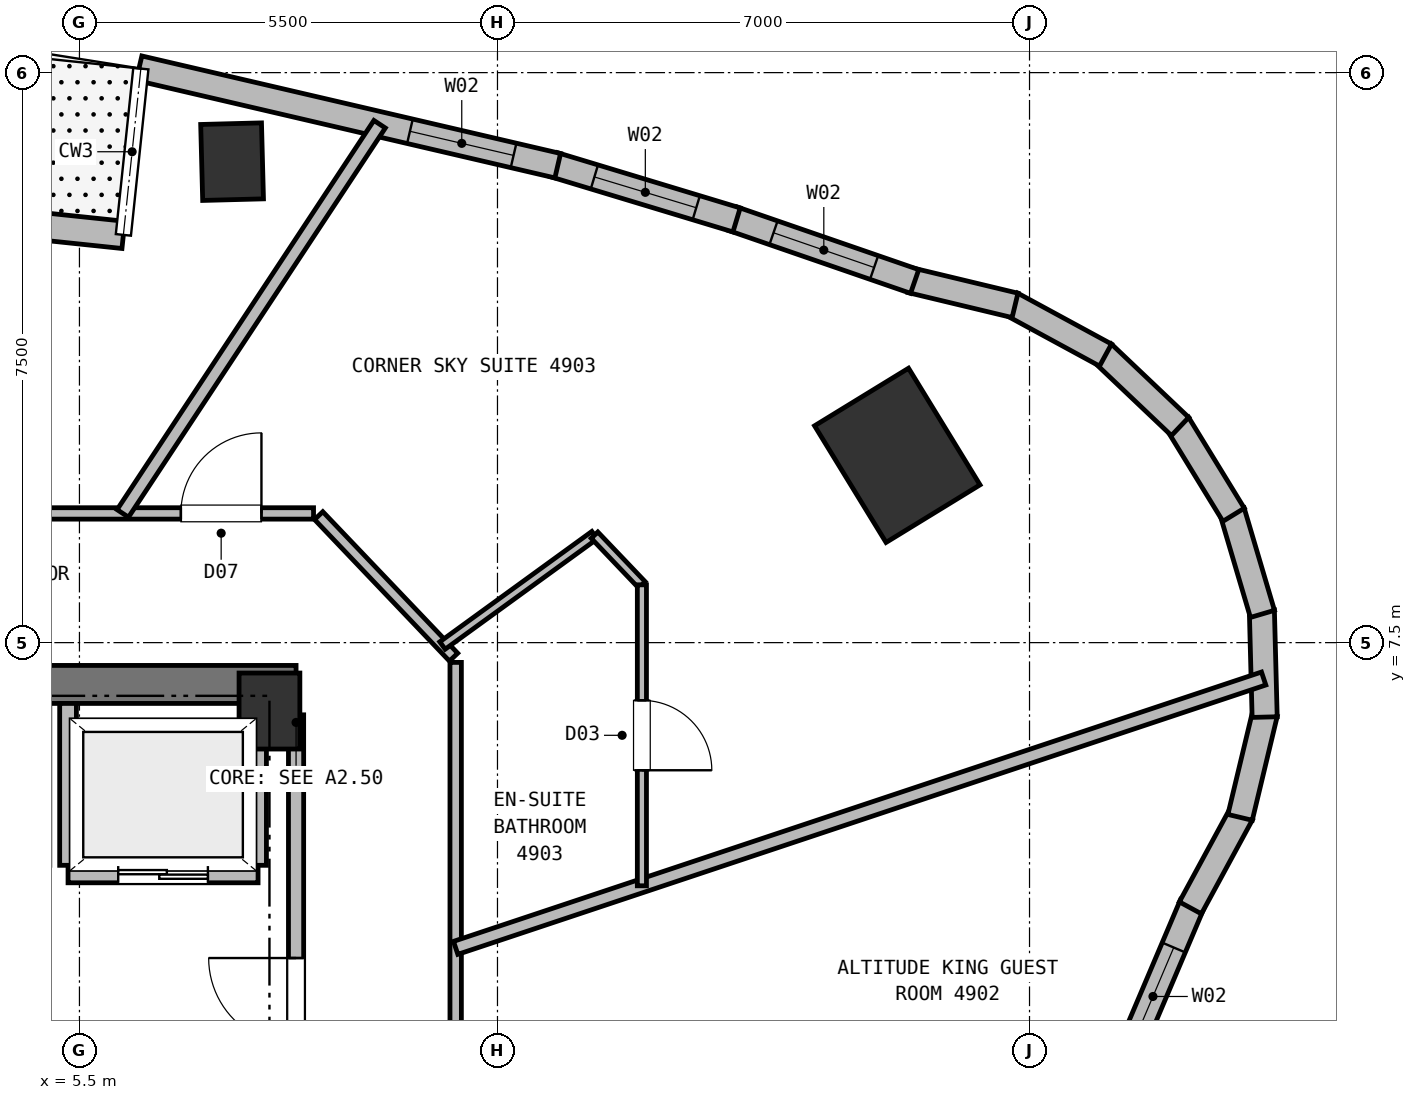
"""IFC4 building model, lengths in metres.
Left out: names, types, materials, properties, quantities, classifications, styles, units other than length and angle.
Written with IfcOpenShell. Run it as: python <this file> out.ifc"""

import sys

from ifc_helpers import new_model, si_unit, direction, frame, frame_2d, origin, origin_2d, place, context, subcontext, project, spatial, rectangle, extrude, element, fill, save


model = new_model("IFC4")
c1 = context("Model", 3, precision=1e-05, world=origin(), true_north=direction((0.0, 1.0)))
c2 = subcontext(c1, "Body", "Model", "MODEL_VIEW")
j1 = project(units=[si_unit("LENGTHUNIT", "METRE"), si_unit("PLANEANGLEUNIT", "RADIAN")], contexts=[c1])
p1 = place(None, origin())
s1 = spatial("IfcSite", under=j1, at=p1, CompositionType="ELEMENT")
p2 = place(p1, origin())
s2 = spatial("IfcBuilding", under=s1, at=p2, CompositionType="ELEMENT")
p3 = place(p2, frame((0.0, 0.0, 186.55)))
s3 = spatial("IfcBuildingStorey", under=s2, at=p3, CompositionType="ELEMENT", Elevation=186.55)
p4 = place(p3, frame((8.0, 6.6, 0.0), z_axis=(0.0, 0.0, 1.0), x_axis=(1.0, 0.0, 0.0)))
e1 = element("IfcColumn", 1, at=p4, inside=s3, PredefinedType="COLUMN", context=c2, shape_type="SweptSolid", body=[
    extrude(rectangle(XDim=0.8, YDim=1.0, at=origin_2d()), origin(), (0.0, 0.0, 1.0), 3.8),
])
p5 = place(p3, frame((-8.35, 6.95, 0.0), z_axis=(0.0, 0.0, 1.0), x_axis=(1.0, 0.0, 0.0)))
e2 = element("IfcWall", 2, at=p5, inside=s3, PredefinedType="SHEAR", context=c2, shape_type="SweptSolid", body=[
    extrude(rectangle(XDim=16.7, YDim=0.5, at=frame_2d((8.35, 0.0))), origin(), (0.0, 0.0, 1.0), 3.55),
])
p6 = place(p3, frame((16.26, 9.964, 0.0), z_axis=(0.0, 0.0, 1.0), x_axis=(0.852640164354, 0.522498564716, 0.0)))
e3 = element("IfcColumn", 3, at=p6, inside=s3, PredefinedType="COLUMN", context=c2, shape_type="SweptSolid", body=[
    extrude(rectangle(XDim=1.45, YDim=1.8, at=origin_2d()), origin(), (0.0, 0.0, 1.0), 3.8),
])
p7 = place(p3, frame((7.508, 13.828, 0.0), z_axis=(0.0, 0.0, 1.0), x_axis=(0.999657324976, 0.026176948308, 0.0)))
e4 = element("IfcColumn", 4, at=p7, inside=s3, PredefinedType="COLUMN", context=c2, shape_type="SweptSolid", body=[
    extrude(rectangle(XDim=0.8, YDim=1.0, at=origin_2d()), origin(), (0.0, 0.0, 1.0), 3.8),
])
p8 = place(p3, frame((-3.271, 13.848, 0.0), z_axis=(0.0, 0.0, 1.0), x_axis=(0.994520954065, -0.104537418785, 0.0)))
e5 = element("IfcWall", 5, at=p8, inside=s3, PredefinedType="SOLIDWALL", context=c2, shape_type="SweptSolid", body=[
    extrude(rectangle(XDim=9.4, YDim=0.36, at=frame_2d((4.7, 0.0))), origin(), (0.0, 0.0, 1.0), 3.55),
])
p9 = place(p8, frame((3.875, 0.0, 0.0)))
e6 = element("IfcOpeningElement", 6, at=p9, cuts=e5, PredefinedType="OPENING", context=c2, shape_type="SweptSolid", body=[
    extrude(rectangle(XDim=1.65, YDim=2.25, at=frame_2d((0.825, 1.125))), frame((0.0, 0.19, 0.0), z_axis=(0.0, -1.0, 0.0), x_axis=(1.0, 0.0, 0.0)), (0.0, 0.0, 1.0), 0.38),
])
p10 = place(p3, frame((20.138, 4.055, 0.0), z_axis=(0.0, 0.0, 1.0), x_axis=(-0.390838099147, -0.920459439766, 0.0)))
e7 = element("IfcWall", 7, at=p10, inside=s3, PredefinedType="SOLIDWALL", context=c2, shape_type="SweptSolid", body=[
    extrude(rectangle(XDim=2.632, YDim=0.33, at=frame_2d((1.316, 0.0))), origin(), (0.0, 0.0, 1.0), 3.55),
])
p11 = place(p10, frame((0.616, 0.0, 0.72)))
e8 = element("IfcOpeningElement", 8, at=p11, cuts=e7, PredefinedType="OPENING", context=c2, shape_type="SweptSolid", body=[
    extrude(rectangle(XDim=1.4, YDim=1.84, at=frame_2d((0.7, 0.92))), frame((0.0, 0.175, 0.0), z_axis=(0.0, -1.0, 0.0), x_axis=(1.0, 0.0, 0.0)), (0.0, 0.0, 1.0), 0.35),
])
p12 = place(p3, frame((20.788, 5.247, 0.0), z_axis=(0.0, 0.0, 1.0), x_axis=(-0.477137792558, -0.878828496871, 0.0)))
e9 = element("IfcWall", 9, at=p12, inside=s3, PredefinedType="SOLIDWALL", context=c2, shape_type="SweptSolid", body=[
    extrude(rectangle(XDim=1.408, YDim=0.33, at=frame_2d((0.704, 0.0))), origin(), (0.0, 0.0, 1.0), 3.55),
])
for number, where, z_axis, x_axis in (
    (10, (21.099, 6.57, 0.0), (0.0, 0.0, 1.0), (-0.233, -0.972, 0.0)),
    (11, (21.057, 7.927, 0.0), (0.0, 0.0, 1.0), (0.026, -1.0, 0.0)),
):
    element("IfcWall", number, at=place(p3, frame(where, z_axis=z_axis, x_axis=x_axis)), inside=s3, PredefinedType="SOLIDWALL", context=c2, shape_type="SweptSolid", body=[
        extrude(rectangle(XDim=1.407, YDim=0.33, at=frame_2d((0.704, 0.0))), origin(), (0.0, 0.0, 1.0), 3.55),
    ])
p13 = place(p3, frame((20.665, 9.228, 0.0), z_axis=(0.0, 0.0, 1.0), x_axis=(0.284100140437, -0.958794613149, 0.0)))
e12 = element("IfcWall", 12, at=p13, inside=s3, PredefinedType="SOLIDWALL", context=c2, shape_type="SweptSolid", body=[
    extrude(rectangle(XDim=1.408, YDim=0.33, at=frame_2d((0.704, 0.0))), origin(), (0.0, 0.0, 1.0), 3.55),
])
for number, where, z_axis, x_axis in (
    (13, (19.95, 10.383, 0.0), (0.0, 0.0, 1.0), (0.523, -0.853, 0.0)),
    (14, (18.96, 11.313, 0.0), (0.0, 0.0, 1.0), (0.725, -0.688, 0.0)),
):
    element("IfcWall", number, at=place(p3, frame(where, z_axis=z_axis, x_axis=x_axis)), inside=s3, PredefinedType="SOLIDWALL", context=c2, shape_type="SweptSolid", body=[
        extrude(rectangle(XDim=1.407, YDim=0.33, at=frame_2d((0.704, 0.0))), origin(), (0.0, 0.0, 1.0), 3.55),
    ])
p14 = place(p3, frame((17.763, 11.955, 0.0), z_axis=(0.0, 0.0, 1.0), x_axis=(0.8789012206, -0.47700382014, 0.0)))
e15 = element("IfcWall", 15, at=p14, inside=s3, PredefinedType="SOLIDWALL", context=c2, shape_type="SweptSolid", body=[
    extrude(rectangle(XDim=1.407, YDim=0.33, at=frame_2d((0.704, 0.0))), origin(), (0.0, 0.0, 1.0), 3.55),
])
p15 = place(p3, frame((16.441, 12.266, 0.0), z_axis=(0.0, 0.0, 1.0), x_axis=(0.972355799013, -0.23350417582, 0.0)))
e16 = element("IfcWall", 16, at=p15, inside=s3, PredefinedType="SOLIDWALL", context=c2, shape_type="SweptSolid", body=[
    extrude(rectangle(XDim=1.407, YDim=0.33, at=frame_2d((0.704, 0.0))), origin(), (0.0, 0.0, 1.0), 3.55),
])
p16 = place(p3, frame((14.098, 13.077, 0.0), z_axis=(0.0, 0.0, 1.0), x_axis=(0.945270347183, -0.326288171311, 0.0)))
e17 = element("IfcWall", 17, at=p16, inside=s3, PredefinedType="SOLIDWALL", context=c2, shape_type="SweptSolid", body=[
    extrude(rectangle(XDim=2.529, YDim=0.33, at=frame_2d((1.265, 0.0))), origin(), (0.0, 0.0, 1.0), 3.55),
])
p17 = place(p16, frame((0.564, 0.0, 0.72)))
e18 = element("IfcOpeningElement", 18, at=p17, cuts=e17, PredefinedType="OPENING", context=c2, shape_type="SweptSolid", body=[
    extrude(rectangle(XDim=1.4, YDim=1.84, at=frame_2d((0.7, 0.92))), frame((0.0, 0.175, 0.0), z_axis=(0.0, -1.0, 0.0), x_axis=(1.0, 0.0, 0.0)), (0.0, 0.0, 1.0), 0.35),
])
p18 = place(p3, frame((11.744, 13.788, 0.0), z_axis=(0.0, 0.0, 1.0), x_axis=(0.957175686943, -0.289507693031, 0.0)))
e19 = element("IfcWall", 19, at=p18, inside=s3, PredefinedType="SOLIDWALL", context=c2, shape_type="SweptSolid", body=[
    extrude(rectangle(XDim=2.509, YDim=0.33, at=frame_2d((1.254, 0.0))), origin(), (0.0, 0.0, 1.0), 3.55),
])
p19 = place(p18, frame((0.554, 0.0, 0.72)))
e20 = element("IfcOpeningElement", 20, at=p19, cuts=e19, PredefinedType="OPENING", context=c2, shape_type="SweptSolid", body=[
    extrude(rectangle(XDim=1.4, YDim=1.84, at=frame_2d((0.7, 0.92))), frame((0.0, 0.175, 0.0), z_axis=(0.0, -1.0, 0.0), x_axis=(1.0, 0.0, 0.0)), (0.0, 0.0, 1.0), 0.35),
])
p20 = place(p3, frame((6.284, 15.059, 0.0), z_axis=(0.0, 0.0, 1.0), x_axis=(0.973919150731, -0.226895323527, 0.0)))
e21 = element("IfcWall", 21, at=p20, inside=s3, PredefinedType="SOLIDWALL", context=c2, shape_type="SweptSolid", body=[
    extrude(rectangle(XDim=5.656, YDim=0.33, at=frame_2d((2.828, 0.0))), origin(), (0.0, 0.0, 1.0), 3.55),
])
p21 = place(p20, frame((3.66, 0.0, 0.72)))
e22 = element("IfcOpeningElement", 22, at=p21, cuts=e21, PredefinedType="OPENING", context=c2, shape_type="SweptSolid", body=[
    extrude(rectangle(XDim=1.4, YDim=1.88, at=frame_2d((0.7, 0.94))), frame((0.0, 0.175, 0.0), z_axis=(0.0, -1.0, 0.0), x_axis=(1.0, 0.0, 0.0)), (0.0, 0.0, 1.0), 0.35),
])
p22 = place(p3, frame((5.35, 4.45, 0.0), z_axis=(0.0, 0.0, 1.0), x_axis=(1.0, 0.0, 0.0)))
e23 = element("IfcWall", 23, at=p22, inside=s3, PredefinedType="PARTITIONING", context=c2, shape_type="SweptSolid", body=[
    extrude(rectangle(XDim=2.5, YDim=0.22, at=frame_2d((1.25, 0.0))), origin(), (0.0, 0.0, 1.0), 3.55),
])
p23 = place(p22, frame((0.66, 0.0, 0.0)))
e24 = element("IfcOpeningElement", 24, at=p23, cuts=e23, PredefinedType="OPENING", context=c2, shape_type="SweptSolid", body=[
    extrude(rectangle(XDim=1.18, YDim=2.15, at=frame_2d((0.59, 1.075))), frame((0.0, 0.12, 0.0), z_axis=(0.0, -1.0, 0.0), x_axis=(1.0, 0.0, 0.0)), (0.0, 0.0, 1.0), 0.24),
])
p24 = place(p3, frame((5.35, 4.57, 0.0), z_axis=(0.0, 0.0, 1.0), x_axis=(0.0, 1.0, 0.0)))
e25 = element("IfcWall", 25, at=p24, inside=s3, PredefinedType="PARTITIONING", context=c2, shape_type="SweptSolid", body=[
    extrude(rectangle(XDim=2.13, YDim=0.22, at=frame_2d((1.065, 0.0))), origin(), (0.0, 0.0, 1.0), 3.55),
])
p25 = place(p3, frame((7.85, 4.57, 0.0), z_axis=(0.0, 0.0, 1.0), x_axis=(0.0, 1.0, 0.0)))
e26 = element("IfcWall", 26, at=p25, inside=s3, PredefinedType="PARTITIONING", context=c2, shape_type="SweptSolid", body=[
    extrude(rectangle(XDim=2.13, YDim=0.22, at=frame_2d((1.065, 0.0))), origin(), (0.0, 0.0, 1.0), 3.18),
])
p26 = place(p3, frame((8.35, 1.25, 0.0), z_axis=(0.0, 0.0, 1.0), x_axis=(0.0, 1.0, 0.0)))
e27 = element("IfcWall", 27, at=p26, inside=s3, PredefinedType="PARTITIONING", context=c2, shape_type="SweptSolid", body=[
    extrude(rectangle(XDim=5.3, YDim=0.2, at=frame_2d((2.65, 0.0))), origin(), (0.0, 0.0, 1.0), 3.55),
])
p27 = place(p26, frame((0.95, 0.0, 0.0)))
e28 = element("IfcOpeningElement", 28, at=p27, cuts=e27, PredefinedType="OPENING", context=c2, shape_type="SweptSolid", body=[
    extrude(rectangle(XDim=1.15, YDim=2.15, at=frame_2d((0.575, 1.075))), frame((0.0, 0.11, 0.0), z_axis=(0.0, -1.0, 0.0), x_axis=(1.0, 0.0, 0.0)), (0.0, 0.0, 1.0), 0.22),
])
p28 = place(p3, frame((10.45, 7.24, 0.0), z_axis=(0.0, 0.0, 1.0), x_axis=(0.0, -1.0, 0.0)))
e29 = element("IfcWall", 29, at=p28, inside=s3, PredefinedType="PARTITIONING", context=c2, shape_type="SweptSolid", body=[
    extrude(rectangle(XDim=14.48, YDim=0.15, at=frame_2d((7.24, 0.0))), origin(), (0.0, 0.0, 1.0), 3.55),
])
p29 = place(p28, frame((11.674, 0.0, 0.0)))
e30 = element("IfcOpeningElement", 30, at=p29, cuts=e29, PredefinedType="OPENING", context=c2, shape_type="SweptSolid", body=[
    extrude(rectangle(XDim=1.06, YDim=2.15, at=frame_2d((0.53, 1.075))), frame((0.0, 0.085, 0.0), z_axis=(0.0, -1.0, 0.0), x_axis=(1.0, 0.0, 0.0)), (0.0, 0.0, 1.0), 0.17),
])
p30 = place(p28, frame((5.006, 0.0, 0.0)))
e31 = element("IfcOpeningElement", 31, at=p30, cuts=e29, PredefinedType="OPENING", context=c2, shape_type="SweptSolid", body=[
    extrude(rectangle(XDim=1.0, YDim=2.15, at=frame_2d((0.5, 1.075))), frame((0.0, 0.085, 0.0), z_axis=(0.0, -1.0, 0.0), x_axis=(1.0, 0.0, 0.0)), (0.0, 0.0, 1.0), 0.17),
])
p31 = place(p3, frame((8.648, 9.171, 0.0), z_axis=(0.0, 0.0, 1.0), x_axis=(0.689960858356, -0.723846678473, 0.0)))
e32 = element("IfcWall", 32, at=p31, inside=s3, PredefinedType="PARTITIONING", context=c2, shape_type="SweptSolid", body=[
    extrude(rectangle(XDim=2.572, YDim=0.15, at=frame_2d((1.286, 0.0))), origin(), (0.0, 0.0, 1.0), 3.55),
])
p32 = place(p3, frame((-8.58, 9.2, 0.0), z_axis=(0.0, 0.0, 1.0), x_axis=(1.0, 0.0, 0.0)))
e33 = element("IfcWall", 33, at=p32, inside=s3, PredefinedType="PARTITIONING", context=c2, shape_type="SweptSolid", body=[
    extrude(rectangle(XDim=17.16, YDim=0.15, at=frame_2d((8.58, 0.0))), origin(), (0.0, 0.0, 1.0), 3.55),
])
p33 = place(p32, frame((9.371, 0.0, 0.0)))
e34 = element("IfcOpeningElement", 34, at=p33, cuts=e33, PredefinedType="OPENING", context=c2, shape_type="SweptSolid", body=[
    extrude(rectangle(XDim=1.0, YDim=2.15, at=frame_2d((0.5, 1.075))), frame((0.0, 0.085, 0.0), z_axis=(0.0, -1.0, 0.0), x_axis=(1.0, 0.0, 0.0)), (0.0, 0.0, 1.0), 0.17),
])
p34 = place(p32, frame((15.415, 0.0, 0.0)))
e35 = element("IfcOpeningElement", 35, at=p34, cuts=e33, PredefinedType="OPENING", context=c2, shape_type="SweptSolid", body=[
    extrude(rectangle(XDim=1.06, YDim=2.15, at=frame_2d((0.53, 1.075))), frame((0.0, 0.085, 0.0), z_axis=(0.0, -1.0, 0.0), x_axis=(1.0, 0.0, 0.0)), (0.0, 0.0, 1.0), 0.17),
])
p35 = place(p3, frame((10.45, 3.484, 0.0), z_axis=(0.0, 0.0, 1.0), x_axis=(0.94867676156, 0.316247374812, 0.0)))
e36 = element("IfcWall", 36, at=p35, inside=s3, PredefinedType="PARTITIONING", context=c2, shape_type="SweptSolid", body=[
    extrude(rectangle(XDim=11.206, YDim=0.18, at=frame_2d((5.603, 0.0))), origin(), (0.0, 0.0, 1.0), 3.55),
])
p36 = place(p3, frame((12.277, 8.914, 0.0), z_axis=(0.0, 0.0, 1.0), x_axis=(-0.809184297192, -0.587554910777, 0.0)))
e37 = element("IfcWall", 37, at=p36, inside=s3, PredefinedType="PARTITIONING", context=c2, shape_type="SweptSolid", body=[
    extrude(rectangle(XDim=2.472, YDim=0.12, at=frame_2d((1.236, 0.0))), origin(), (0.0, 0.0, 1.0), 3.55),
])
p37 = place(p3, frame((12.277, 8.914, 0.0), z_axis=(0.0, 0.0, 1.0), x_axis=(0.689871145132, -0.723932181295, 0.0)))
e38 = element("IfcWall", 38, at=p37, inside=s3, PredefinedType="PARTITIONING", context=c2, shape_type="SweptSolid", body=[
    extrude(rectangle(XDim=0.903, YDim=0.12, at=frame_2d((0.452, 0.0))), origin(), (0.0, 0.0, 1.0), 3.55),
])
p38 = place(p3, frame((12.9, 8.26, 0.0), z_axis=(0.0, 0.0, 1.0), x_axis=(0.0, -1.0, 0.0)))
e39 = element("IfcWall", 39, at=p38, inside=s3, PredefinedType="PARTITIONING", context=c2, shape_type="SweptSolid", body=[
    extrude(rectangle(XDim=3.96, YDim=0.12, at=frame_2d((1.98, 0.0))), origin(), (0.0, 0.0, 1.0), 3.55),
])
p39 = place(p38, frame((1.52, 0.0, 0.0)))
e40 = element("IfcOpeningElement", 40, at=p39, cuts=e39, PredefinedType="OPENING", context=c2, shape_type="SweptSolid", body=[
    extrude(rectangle(XDim=0.92, YDim=2.1, at=frame_2d((0.46, 1.05))), frame((0.0, 0.07, 0.0), z_axis=(0.0, -1.0, 0.0), x_axis=(1.0, 0.0, 0.0)), (0.0, 0.0, 1.0), 0.14),
])
p40 = place(p3, frame((6.07, 9.2, 0.0), z_axis=(0.0, 0.0, 1.0), x_axis=(0.550708603457, 0.834697570428, 0.0)))
e41 = element("IfcWall", 41, at=p40, inside=s3, PredefinedType="PARTITIONING", context=c2, shape_type="SweptSolid", body=[
    extrude(rectangle(XDim=6.135, YDim=0.18, at=frame_2d((3.068, 0.0))), origin(), (0.0, 0.0, 1.0), 3.55),
])
p41 = place(p11, origin())
e42 = element("IfcWindow", 42, at=p41, inside=s3, PartitioningType="SINGLE_PANEL", PredefinedType="WINDOW", context=c2, shape_type="SweptSolid", body=[
    extrude(rectangle(XDim=1.4, YDim=1.84, at=frame_2d((0.7, 0.92))), frame((0.0, 0.03, 0.0), z_axis=(0.0, -1.0, 0.0), x_axis=(1.0, 0.0, 0.0)), (0.0, 0.0, 1.0), 0.06),
])
fill(e8, e42)
p42 = place(p17, origin())
e43 = element("IfcWindow", 43, at=p42, inside=s3, PartitioningType="SINGLE_PANEL", PredefinedType="WINDOW", context=c2, shape_type="SweptSolid", body=[
    extrude(rectangle(XDim=1.4, YDim=1.84, at=frame_2d((0.7, 0.92))), frame((0.0, 0.03, 0.0), z_axis=(0.0, -1.0, 0.0), x_axis=(1.0, 0.0, 0.0)), (0.0, 0.0, 1.0), 0.06),
])
fill(e18, e43)
p43 = place(p19, origin())
e44 = element("IfcWindow", 44, at=p43, inside=s3, PartitioningType="SINGLE_PANEL", PredefinedType="WINDOW", context=c2, shape_type="SweptSolid", body=[
    extrude(rectangle(XDim=1.4, YDim=1.84, at=frame_2d((0.7, 0.92))), frame((0.0, 0.03, 0.0), z_axis=(0.0, -1.0, 0.0), x_axis=(1.0, 0.0, 0.0)), (0.0, 0.0, 1.0), 0.06),
])
fill(e20, e44)
p44 = place(p21, origin())
e45 = element("IfcWindow", 45, at=p44, inside=s3, PartitioningType="SINGLE_PANEL", PredefinedType="WINDOW", context=c2, shape_type="SweptSolid", body=[
    extrude(rectangle(XDim=1.4, YDim=1.88, at=frame_2d((0.7, 0.94))), frame((0.0, 0.03, 0.0), z_axis=(0.0, -1.0, 0.0), x_axis=(1.0, 0.0, 0.0)), (0.0, 0.0, 1.0), 0.06),
])
fill(e22, e45)
p45 = place(p23, origin())
e46 = element("IfcDoor", 46, at=p45, inside=s3, OperationType="DOUBLE_DOOR_SLIDING", PredefinedType="DOOR", context=c2, shape_type="SweptSolid", body=[
    extrude(rectangle(XDim=1.18, YDim=2.15, at=frame_2d((0.59, 1.075))), frame((0.0, 0.025, 0.0), z_axis=(0.0, -1.0, 0.0), x_axis=(1.0, 0.0, 0.0)), (0.0, 0.0, 1.0), 0.05),
])
fill(e24, e46)
p46 = place(p27, origin())
e47 = element("IfcDoor", 47, at=p46, inside=s3, OperationType="SINGLE_SWING_RIGHT", PredefinedType="DOOR", context=c2, shape_type="SweptSolid", body=[
    extrude(rectangle(XDim=1.15, YDim=2.15, at=frame_2d((0.575, 1.075))), frame((0.0, 0.025, 0.0), z_axis=(0.0, -1.0, 0.0), x_axis=(1.0, 0.0, 0.0)), (0.0, 0.0, 1.0), 0.05),
])
fill(e28, e47)
p47 = place(p39, origin())
e48 = element("IfcDoor", 48, at=p47, inside=s3, OperationType="SINGLE_SWING_RIGHT", PredefinedType="DOOR", context=c2, shape_type="SweptSolid", body=[
    extrude(rectangle(XDim=0.92, YDim=2.1, at=frame_2d((0.46, 1.05))), frame((0.0, 0.025, 0.0), z_axis=(0.0, -1.0, 0.0), x_axis=(1.0, 0.0, 0.0)), (0.0, 0.0, 1.0), 0.05),
])
fill(e40, e48)
p48 = place(p34, origin())
e49 = element("IfcDoor", 49, at=p48, inside=s3, OperationType="SINGLE_SWING_RIGHT", PredefinedType="DOOR", context=c2, shape_type="SweptSolid", body=[
    extrude(rectangle(XDim=1.06, YDim=2.15, at=frame_2d((0.53, 1.075))), frame((0.0, 0.025, 0.0), z_axis=(0.0, -1.0, 0.0), x_axis=(1.0, 0.0, 0.0)), (0.0, 0.0, 1.0), 0.05),
])
fill(e35, e49)
save(model, sys.argv[1])
